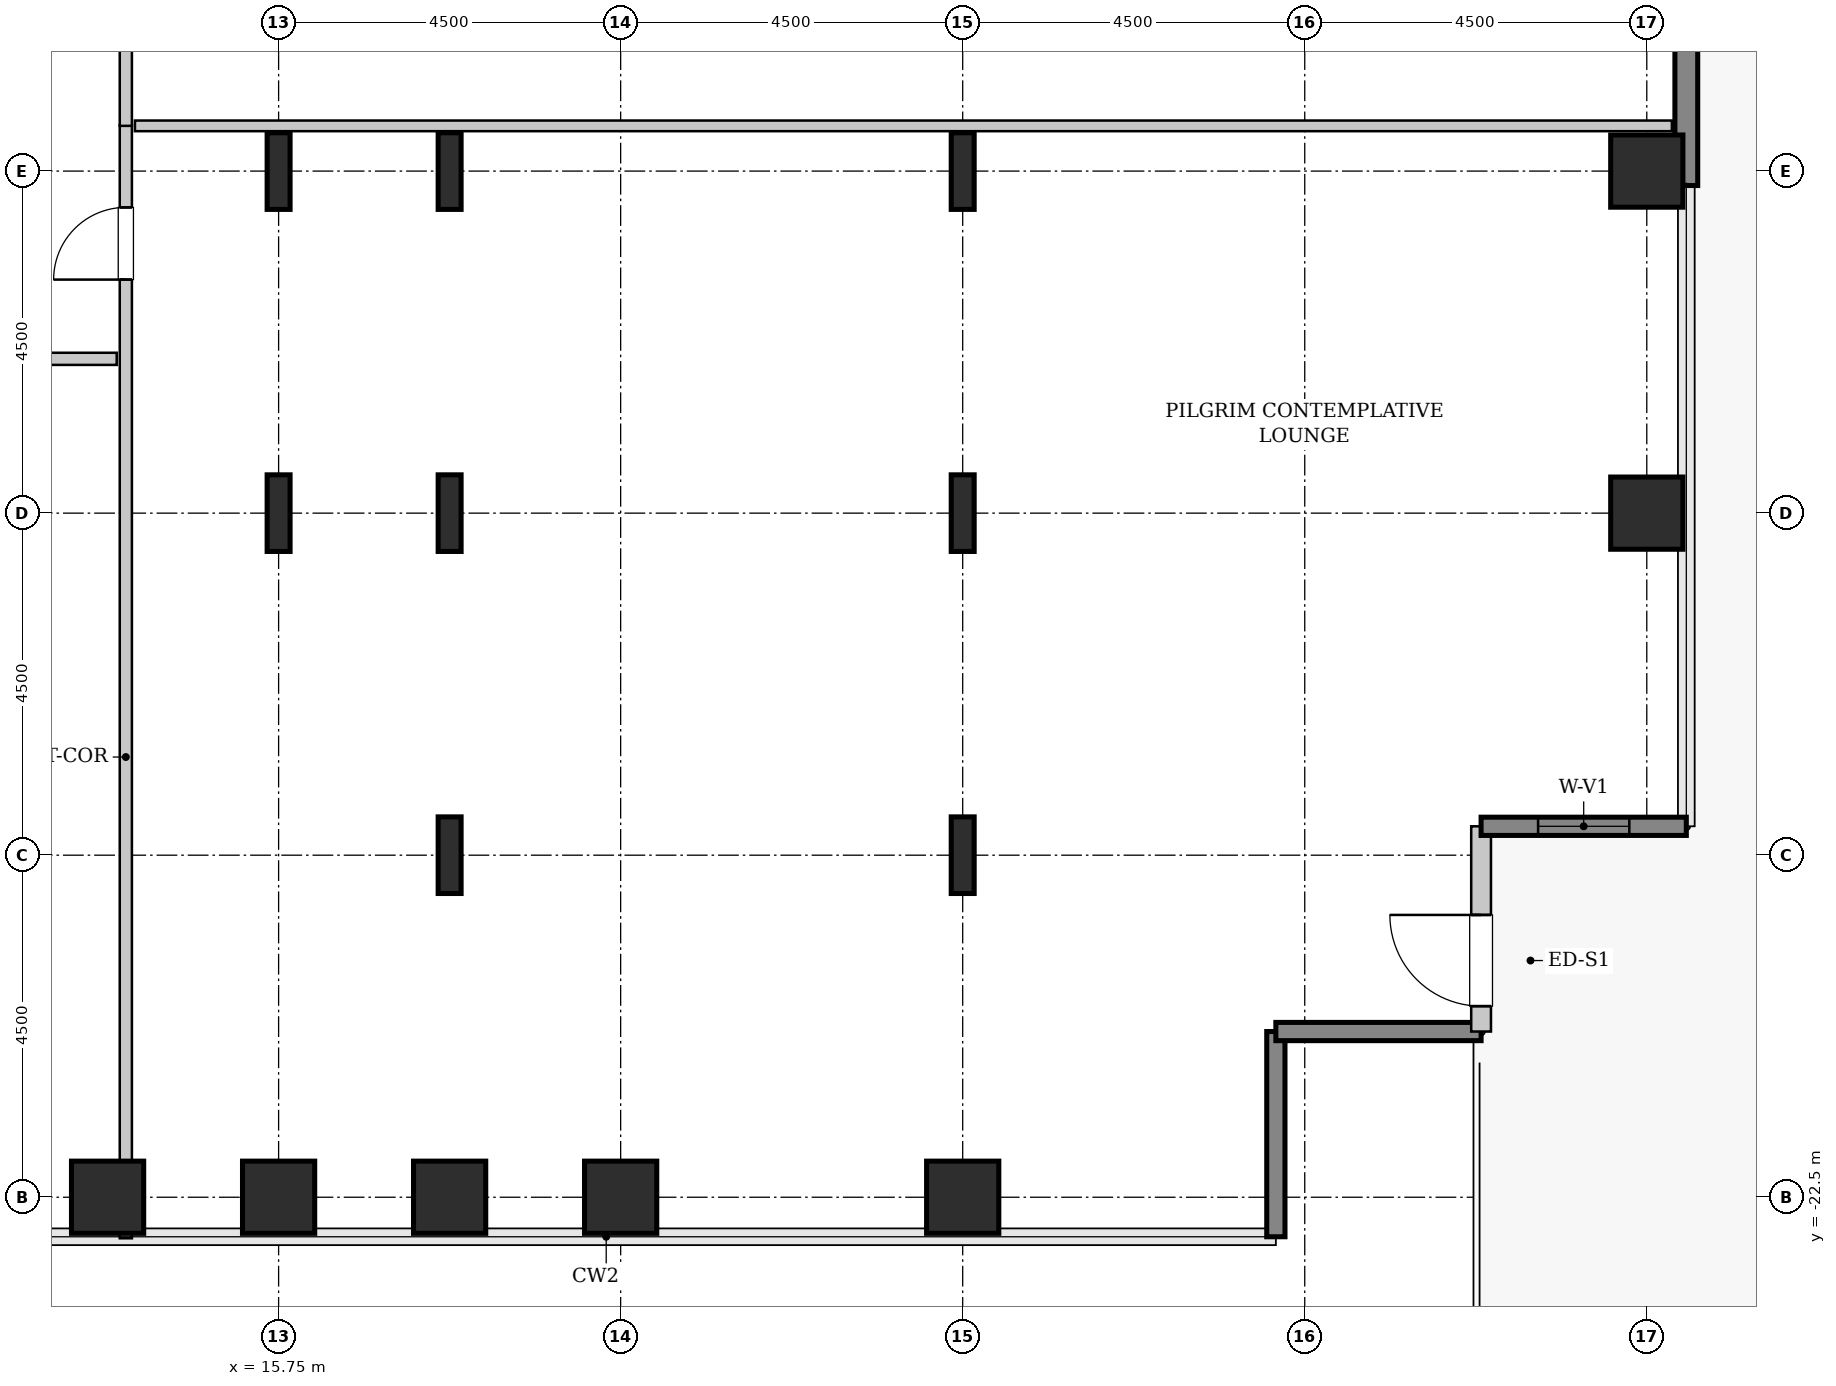
"""IFC4 building model, lengths in metres.
Left out: names, types, materials, properties, quantities, classifications, styles, units other than length and angle.
Written with IfcOpenShell. Run it as: python <this file> out.ifc"""

import sys

from ifc_helpers import new_model, si_unit, direction, frame, frame_2d, origin, origin_2d, place, context, subcontext, project, spatial, rectangle, hollow_rectangle, i_section, extrude, source, transform, mapped, element, fill, save


model = new_model("IFC4")
c1 = context("Model", 3, precision=1e-05, world=origin(), true_north=direction((0.0, 1.0)))
c2 = subcontext(c1, "Body", "Model", "MODEL_VIEW")
j1 = project(units=[si_unit("LENGTHUNIT", "METRE"), si_unit("PLANEANGLEUNIT", "RADIAN")], contexts=[c1])
p1 = place(None, origin())
s1 = spatial("IfcSite", under=j1, at=p1, CompositionType="ELEMENT")
p2 = place(p1, origin())
s2 = spatial("IfcBuilding", under=s1, at=p2, CompositionType="ELEMENT")
p3 = place(p2, frame((0.0, 0.0, 33.0)))
s3 = spatial("IfcBuildingStorey", under=s2, at=p3, CompositionType="ELEMENT", Elevation=33.0)
m1 = source(origin(), c2, "Body", "SweptSolid", [
    extrude(hollow_rectangle(XDim=0.95, YDim=0.95, WallThickness=0.045, InnerFilletRadius=0.045, OuterFilletRadius=0.09, at=origin_2d()), origin(), (0.0, 0.0, 1.0), 3.8),
])
for number, where, z_axis, x_axis in (
    (1, (13.5, -22.5, 0.0), (0.0, 0.0, 1.0), (1.0, 0.0, 0.0)),
    (2, (15.75, -22.5, 0.0), (0.0, 0.0, 1.0), (1.0, 0.0, 0.0)),
):
    element("IfcColumn", number, at=place(p3, frame(where, z_axis=z_axis, x_axis=x_axis)), inside=s3, PredefinedType="COLUMN", context=c2, shape_type="MappedRepresentation", body=[
        mapped(m1, transform((0.0, 0.0, 0.0), x_axis=(1.0, 0.0, 0.0), y_axis=(0.0, 1.0, 0.0), z_axis=(0.0, 0.0, 1.0), scale=1.0)),
    ])
m2 = source(origin(), c2, "Body", "SweptSolid", [
    extrude(i_section(OverallWidth=0.302, OverallDepth=1.008, WebThickness=0.021, FlangeThickness=0.04, FilletRadius=0.03, at=origin_2d()), origin(), (0.0, 0.0, 1.0), 3.8),
])
for number, where, z_axis, x_axis in (
    (3, (15.75, -13.5, 0.0), (0.0, 0.0, 1.0), (1.0, 0.0, 0.0)),
    (4, (15.75, -9.0, 0.0), (0.0, 0.0, 1.0), (1.0, 0.0, 0.0)),
):
    element("IfcColumn", number, at=place(p3, frame(where, z_axis=z_axis, x_axis=x_axis)), inside=s3, PredefinedType="COLUMN", context=c2, shape_type="MappedRepresentation", body=[
        mapped(m2, transform((0.0, 0.0, 0.0), x_axis=(1.0, 0.0, 0.0), y_axis=(0.0, 1.0, 0.0), z_axis=(0.0, 0.0, 1.0), scale=1.0)),
    ])
p4 = place(p3, frame((18.0, -22.5, 0.0), z_axis=(0.0, 0.0, 1.0), x_axis=(1.0, 0.0, 0.0)))
e5 = element("IfcColumn", 5, at=p4, inside=s3, PredefinedType="COLUMN", context=c2, shape_type="MappedRepresentation", body=[
    mapped(m1, transform((0.0, 0.0, 0.0), x_axis=(1.0, 0.0, 0.0), y_axis=(0.0, 1.0, 0.0), z_axis=(0.0, 0.0, 1.0), scale=1.0)),
])
for number, where, z_axis, x_axis in (
    (6, (18.0, -18.0, 0.0), (0.0, 0.0, 1.0), (1.0, 0.0, 0.0)),
    (7, (18.0, -13.5, 0.0), (0.0, 0.0, 1.0), (1.0, 0.0, 0.0)),
    (8, (18.0, -9.0, 0.0), (0.0, 0.0, 1.0), (1.0, 0.0, 0.0)),
):
    element("IfcColumn", number, at=place(p3, frame(where, z_axis=z_axis, x_axis=x_axis)), inside=s3, PredefinedType="COLUMN", context=c2, shape_type="MappedRepresentation", body=[
        mapped(m2, transform((0.0, 0.0, 0.0), x_axis=(1.0, 0.0, 0.0), y_axis=(0.0, 1.0, 0.0), z_axis=(0.0, 0.0, 1.0), scale=1.0)),
    ])
for number, where, z_axis, x_axis in (
    (9, (20.25, -22.5, 0.0), (0.0, 0.0, 1.0), (1.0, 0.0, 0.0)),
    (10, (24.75, -22.5, 0.0), (0.0, 0.0, 1.0), (1.0, 0.0, 0.0)),
):
    element("IfcColumn", number, at=place(p3, frame(where, z_axis=z_axis, x_axis=x_axis)), inside=s3, PredefinedType="COLUMN", context=c2, shape_type="MappedRepresentation", body=[
        mapped(m1, transform((0.0, 0.0, 0.0), x_axis=(1.0, 0.0, 0.0), y_axis=(0.0, 1.0, 0.0), z_axis=(0.0, 0.0, 1.0), scale=1.0)),
    ])
for number, where, z_axis, x_axis in (
    (11, (24.75, -18.0, 0.0), (0.0, 0.0, 1.0), (1.0, 0.0, 0.0)),
    (12, (24.75, -13.5, 0.0), (0.0, 0.0, 1.0), (1.0, 0.0, 0.0)),
    (13, (24.75, -9.0, 0.0), (0.0, 0.0, 1.0), (1.0, 0.0, 0.0)),
):
    element("IfcColumn", number, at=place(p3, frame(where, z_axis=z_axis, x_axis=x_axis)), inside=s3, PredefinedType="COLUMN", context=c2, shape_type="MappedRepresentation", body=[
        mapped(m2, transform((0.0, 0.0, 0.0), x_axis=(1.0, 0.0, 0.0), y_axis=(0.0, 1.0, 0.0), z_axis=(0.0, 0.0, 1.0), scale=1.0)),
    ])
for number, where, z_axis, x_axis in (
    (14, (33.75, -13.5, 0.0), (0.0, 0.0, 1.0), (1.0, 0.0, 0.0)),
    (15, (33.75, -9.0, 0.0), (0.0, 0.0, 1.0), (1.0, 0.0, 0.0)),
):
    element("IfcColumn", number, at=place(p3, frame(where, z_axis=z_axis, x_axis=x_axis)), inside=s3, PredefinedType="COLUMN", context=c2, shape_type="MappedRepresentation", body=[
        mapped(m1, transform((0.0, 0.0, 0.0), x_axis=(1.0, 0.0, 0.0), y_axis=(0.0, 1.0, 0.0), z_axis=(0.0, 0.0, 1.0), scale=1.0)),
    ])
m3 = source(origin(), c2, "Body", "SweptSolid", [
    extrude(rectangle(XDim=4.88, YDim=0.3, at=frame_2d((2.44, 0.0))), origin(), (0.0, 0.0, 1.0), 3.55),
])
p5 = place(p3, frame((34.27, -9.19, 0.0), z_axis=(0.0, 0.0, 1.0), x_axis=(0.0, 1.0, 0.0)))
e16 = element("IfcWall", 16, at=p5, inside=s3, PredefinedType="SHEAR", context=c2, shape_type="MappedRepresentation", body=[
    mapped(m3, transform((0.0, 0.0, 0.0), x_axis=(1.0, 0.0, 0.0), y_axis=(0.0, 1.0, 0.0), z_axis=(0.0, 0.0, 1.0), scale=1.0)),
])
m4 = source(origin(), c2, "Body", "SweptSolid", [
    extrude(rectangle(XDim=2.7, YDim=0.24, at=frame_2d((1.35, 0.0))), origin(), (0.0, 0.0, 1.0), 3.55),
])
for number, where, z_axis, x_axis in (
    (17, (28.87, -23.02, 0.0), (0.0, 0.0, 1.0), (0.0, 1.0, 0.0)),
    (18, (28.87, -20.32, 0.0), (0.0, 0.0, 1.0), (1.0, 0.0, 0.0)),
):
    element("IfcWall", number, at=place(p3, frame(where, z_axis=z_axis, x_axis=x_axis)), inside=s3, PredefinedType="SHEAR", context=c2, shape_type="MappedRepresentation", body=[
        mapped(m4, transform((0.0, 0.0, 0.0), x_axis=(1.0, 0.0, 0.0), y_axis=(0.0, 1.0, 0.0), z_axis=(0.0, 0.0, 1.0), scale=1.0)),
    ])
m5 = source(origin(), c2, "Body", "SweptSolid", [
    extrude(rectangle(XDim=2.7, YDim=0.26, at=frame_2d((1.35, 0.0))), origin(), (0.0, 0.0, 1.0), 3.55),
])
p6 = place(p3, frame((31.57, -20.32, 0.0), z_axis=(0.0, 0.0, 1.0), x_axis=(0.0, 1.0, 0.0)))
e19 = element("IfcWall", 19, at=p6, inside=s3, PredefinedType="SOLIDWALL", context=c2, shape_type="MappedRepresentation", body=[
    mapped(m5, transform((0.0, 0.0, 0.0), x_axis=(1.0, 0.0, 0.0), y_axis=(0.0, 1.0, 0.0), z_axis=(0.0, 0.0, 1.0), scale=1.0)),
])
p7 = place(p6, frame((0.334, 0.0, 0.0)))
e20 = element("IfcOpeningElement", 20, at=p7, cuts=e19, PredefinedType="OPENING", context=c2, shape_type="SweptSolid", body=[
    extrude(rectangle(XDim=1.2, YDim=2.2, at=frame_2d((0.6, 1.1))), frame((0.0, 0.14, 0.0), z_axis=(0.0, -1.0, 0.0), x_axis=(1.0, 0.0, 0.0)), (0.0, 0.0, 1.0), 0.28),
])
p8 = place(p3, frame((31.57, -17.62, 0.0), z_axis=(0.0, 0.0, 1.0), x_axis=(1.0, 0.0, 0.0)))
e21 = element("IfcWall", 21, at=p8, inside=s3, PredefinedType="SHEAR", context=c2, shape_type="MappedRepresentation", body=[
    mapped(m4, transform((0.0, 0.0, 0.0), x_axis=(1.0, 0.0, 0.0), y_axis=(0.0, 1.0, 0.0), z_axis=(0.0, 0.0, 1.0), scale=1.0)),
])
p9 = place(p8, frame((0.75, 0.0, 0.85)))
e22 = element("IfcOpeningElement", 22, at=p9, cuts=e21, PredefinedType="OPENING", context=c2, shape_type="SweptSolid", body=[
    extrude(rectangle(XDim=1.2, YDim=1.8, at=frame_2d((0.6, 0.9))), frame((0.0, 0.13, 0.0), z_axis=(0.0, -1.0, 0.0), x_axis=(1.0, 0.0, 0.0)), (0.0, 0.0, 1.0), 0.26),
])
m6 = source(origin(), c2, "Body", "SweptSolid", [
    extrude(rectangle(XDim=14.645, YDim=0.16, at=frame_2d((7.323, 0.0))), origin(), (0.0, 0.0, 1.0), 3.535),
])
p10 = place(p3, frame((13.74, -23.04, 0.0), z_axis=(0.0, 0.0, 1.0), x_axis=(0.0, 1.0, 0.0)))
e23 = element("IfcWall", 23, at=p10, inside=s3, PredefinedType="PARTITIONING", context=c2, shape_type="MappedRepresentation", body=[
    mapped(m6, transform((0.0, 0.0, 0.0), x_axis=(1.0, 0.0, 0.0), y_axis=(0.0, 1.0, 0.0), z_axis=(0.0, 0.0, 1.0), scale=1.0)),
])
p11 = place(p10, frame((12.613, 0.0, 0.0)))
e24 = element("IfcOpeningElement", 24, at=p11, cuts=e23, PredefinedType="OPENING", context=c2, shape_type="SweptSolid", body=[
    extrude(rectangle(XDim=0.95, YDim=2.1, at=frame_2d((0.475, 1.05))), frame((0.0, 0.09, 0.0), z_axis=(0.0, -1.0, 0.0), x_axis=(1.0, 0.0, 0.0)), (0.0, 0.0, 1.0), 0.18),
])
m7 = source(origin(), c2, "Body", "SweptSolid", [
    extrude(rectangle(XDim=20.22, YDim=0.14, at=frame_2d((10.11, 0.0))), origin(), (0.0, 0.0, 1.0), 3.535),
])
p12 = place(p3, frame((13.86, -8.405, 0.0), z_axis=(0.0, 0.0, 1.0), x_axis=(1.0, 0.0, 0.0)))
e25 = element("IfcWall", 25, at=p12, inside=s3, PredefinedType="PARTITIONING", context=c2, shape_type="MappedRepresentation", body=[
    mapped(m7, transform((0.0, 0.0, 0.0), x_axis=(1.0, 0.0, 0.0), y_axis=(0.0, 1.0, 0.0), z_axis=(0.0, 0.0, 1.0), scale=1.0)),
])
m8 = source(origin(), c2, "Body", "SweptSolid", [
    extrude(rectangle(XDim=3.61, YDim=0.16, at=frame_2d((1.805, 0.0))), origin(), (0.0, 0.0, 1.0), 3.535),
])
p13 = place(p3, frame((13.74, -8.405, 0.0), z_axis=(0.0, 0.0, 1.0), x_axis=(0.0, 1.0, 0.0)))
e26 = element("IfcWall", 26, at=p13, inside=s3, PredefinedType="PARTITIONING", context=c2, shape_type="MappedRepresentation", body=[
    mapped(m8, transform((0.0, 0.0, 0.0), x_axis=(1.0, 0.0, 0.0), y_axis=(0.0, 1.0, 0.0), z_axis=(0.0, 0.0, 1.0), scale=1.0)),
])
p14 = place(p13, frame((1.33, 0.0, 0.0)))
e27 = element("IfcOpeningElement", 27, at=p14, cuts=e26, PredefinedType="OPENING", context=c2, shape_type="SweptSolid", body=[
    extrude(rectangle(XDim=0.95, YDim=2.1, at=frame_2d((0.475, 1.05))), frame((0.0, 0.09, 0.0), z_axis=(0.0, -1.0, 0.0), x_axis=(1.0, 0.0, 0.0)), (0.0, 0.0, 1.0), 0.18),
])
m9 = source(origin(), c2, "Body", "SweptSolid", [
    extrude(rectangle(XDim=5.225, YDim=0.16, at=frame_2d((2.613, 0.0))), origin(), (0.0, 0.0, 1.0), 3.535),
])
p15 = place(p3, frame((8.395, -11.47, 0.0), z_axis=(0.0, 0.0, 1.0), x_axis=(1.0, 0.0, 0.0)))
e28 = element("IfcWall", 28, at=p15, inside=s3, PredefinedType="PARTITIONING", context=c2, shape_type="MappedRepresentation", body=[
    mapped(m9, transform((0.0, 0.0, 0.0), x_axis=(1.0, 0.0, 0.0), y_axis=(0.0, 1.0, 0.0), z_axis=(0.0, 0.0, 1.0), scale=1.0)),
])
p16 = place(p15, frame((2.137, 0.0, 0.0)))
e29 = element("IfcOpeningElement", 29, at=p16, cuts=e28, PredefinedType="OPENING", context=c2, shape_type="SweptSolid", body=[
    extrude(rectangle(XDim=0.95, YDim=2.1, at=frame_2d((0.475, 1.05))), frame((0.0, 0.09, 0.0), z_axis=(0.0, -1.0, 0.0), x_axis=(1.0, 0.0, 0.0)), (0.0, 0.0, 1.0), 0.18),
])
m10 = source(origin(), c2, "Body", "SweptSolid", [
    extrude(rectangle(XDim=1.2, YDim=2.2, at=frame_2d((0.6, 1.1))), frame((0.0, 0.025, 0.0), z_axis=(0.0, -1.0, 0.0), x_axis=(1.0, 0.0, 0.0)), (0.0, 0.0, 1.0), 0.05),
])
p17 = place(p7, origin())
e30 = element("IfcDoor", 30, at=p17, inside=s3, OperationType="SINGLE_SWING_RIGHT", PredefinedType="DOOR", context=c2, shape_type="MappedRepresentation", body=[
    mapped(m10, transform((0.0, 0.0, 0.0), x_axis=(1.0, 0.0, 0.0), y_axis=(0.0, 1.0, 0.0), z_axis=(0.0, 0.0, 1.0), scale=1.0)),
])
fill(e20, e30)
m11 = source(origin(), c2, "Body", "SweptSolid", [
    extrude(rectangle(XDim=1.2, YDim=1.8, at=frame_2d((0.6, 0.9))), frame((0.0, 0.03, 0.0), z_axis=(0.0, -1.0, 0.0), x_axis=(1.0, 0.0, 0.0)), (0.0, 0.0, 1.0), 0.06),
])
p18 = place(p9, origin())
e31 = element("IfcWindow", 31, at=p18, inside=s3, PartitioningType="SINGLE_PANEL", PredefinedType="WINDOW", context=c2, shape_type="MappedRepresentation", body=[
    mapped(m11, transform((0.0, 0.0, 0.0), x_axis=(1.0, 0.0, 0.0), y_axis=(0.0, 1.0, 0.0), z_axis=(0.0, 0.0, 1.0), scale=1.0)),
])
fill(e22, e31)
m12 = source(origin(), c2, "Body", "SweptSolid", [
    extrude(rectangle(XDim=0.95, YDim=2.1, at=frame_2d((0.475, 1.05))), frame((0.0, 0.025, 0.0), z_axis=(0.0, -1.0, 0.0), x_axis=(1.0, 0.0, 0.0)), (0.0, 0.0, 1.0), 0.05),
])
p19 = place(p11, origin())
e32 = element("IfcDoor", 32, at=p19, inside=s3, OperationType="SINGLE_SWING_LEFT", PredefinedType="DOOR", context=c2, shape_type="MappedRepresentation", body=[
    mapped(m12, transform((0.0, 0.0, 0.0), x_axis=(1.0, 0.0, 0.0), y_axis=(0.0, 1.0, 0.0), z_axis=(0.0, 0.0, 1.0), scale=1.0)),
])
fill(e24, e32)
save(model, sys.argv[1])
